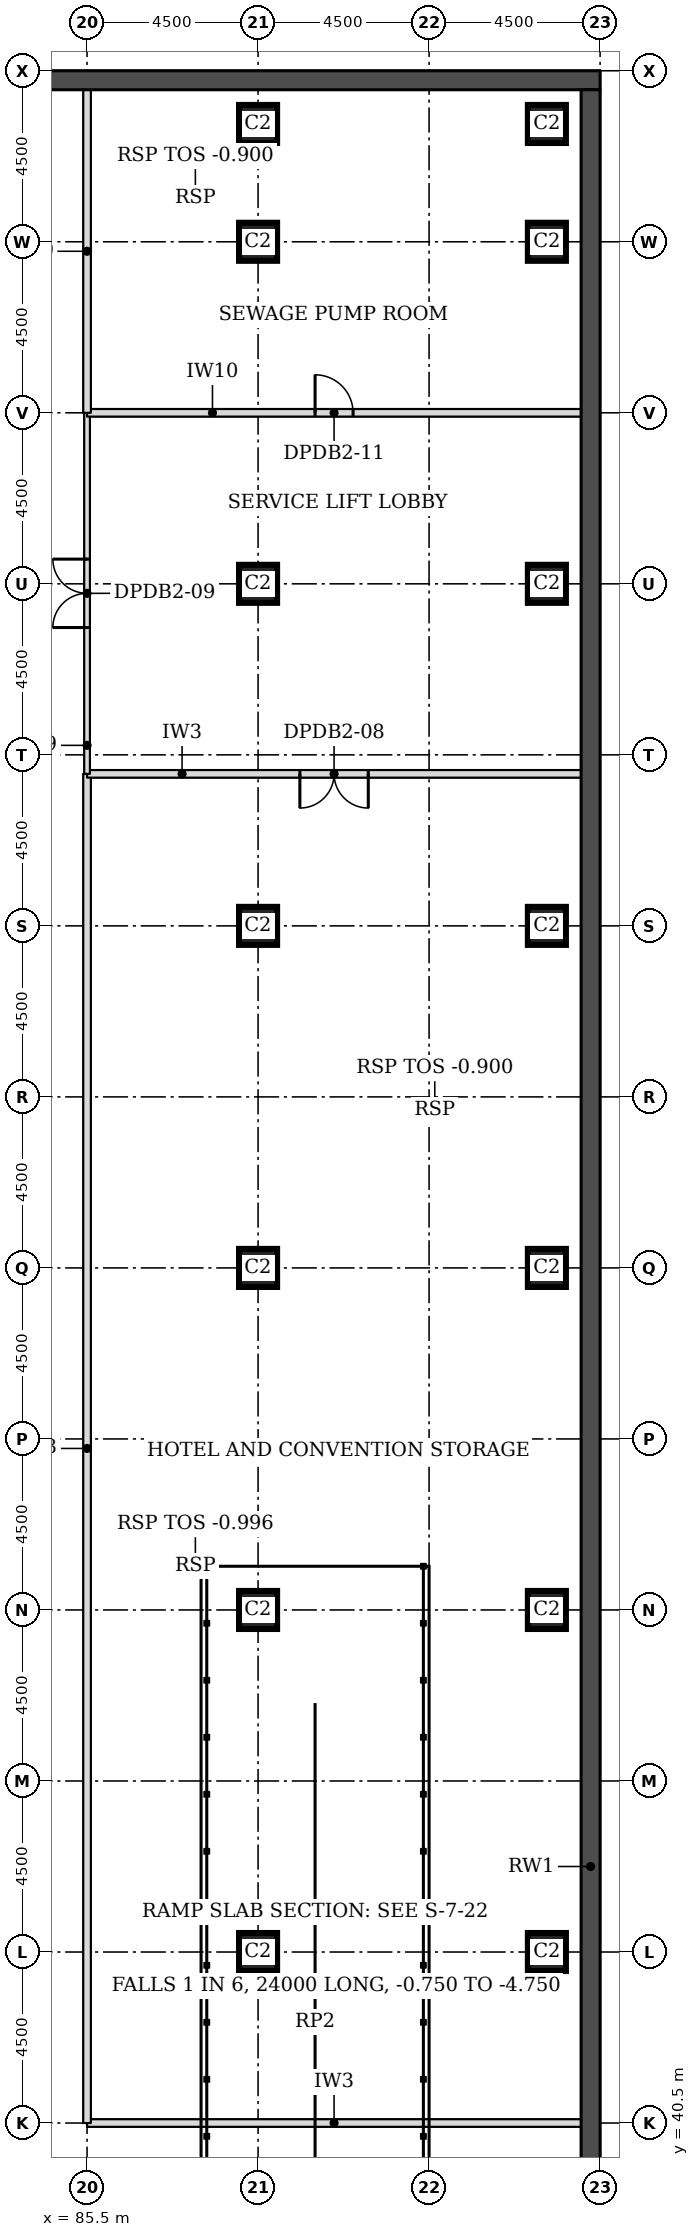
"""IFC4 building model, lengths in metres.
Left out: names, types, materials, properties, quantities, classifications, styles, units other than length and angle.
Written with IfcOpenShell. Run it as: python <this file> out.ifc"""

import sys

from ifc_helpers import new_model, si_unit, direction, frame, frame_2d, origin, origin_2d, place, context, subcontext, project, spatial, rectangle, hollow_rectangle, extrude, element, fill, save


model = new_model("IFC4")
c1 = context("Model", 3, precision=1e-05, world=origin(), true_north=direction((0.0, 1.0)))
c2 = subcontext(c1, "Body", "Model", "MODEL_VIEW")
j1 = project(units=[si_unit("LENGTHUNIT", "METRE"), si_unit("PLANEANGLEUNIT", "RADIAN")], contexts=[c1])
p1 = place(None, origin())
s1 = spatial("IfcSite", under=j1, at=p1, CompositionType="ELEMENT")
p2 = place(p1, origin())
s2 = spatial("IfcBuilding", under=s1, at=p2, CompositionType="ELEMENT")
p3 = place(p2, frame((0.0, 0.0, -9.0)))
s3 = spatial("IfcBuildingStorey", under=s2, at=p3, CompositionType="ELEMENT", Elevation=-9.0)
p4 = place(p3, frame((0.0, 94.25, -0.4), z_axis=(0.0, 0.0, 1.0), x_axis=(1.0, 0.0, 0.0)))
e1 = element("IfcWall", 1, at=p4, inside=s3, PredefinedType="SOLIDWALL", context=c2, shape_type="SweptSolid", body=[
    extrude(rectangle(XDim=99.0, YDim=0.5, at=frame_2d((49.5, 0.0))), origin(), (0.0, 0.0, 1.0), 4.5),
])
p5 = place(p3, frame((98.75, 0.5, -0.4), z_axis=(0.0, 0.0, 1.0), x_axis=(0.0, 1.0, 0.0)))
e2 = element("IfcWall", 2, at=p5, inside=s3, PredefinedType="SOLIDWALL", context=c2, shape_type="SweptSolid", body=[
    extrude(rectangle(XDim=93.5, YDim=0.5, at=frame_2d((46.75, 0.0))), origin(), (0.0, 0.0, 1.0), 4.5),
])
for number, where, z_axis, x_axis in (
    (3, (90.0, 45.0, -0.4), (0.0, 0.0, 1.0), (1.0, 0.0, 0.0)),
    (4, (90.0, 54.0, -0.4), (0.0, 0.0, 1.0), (1.0, 0.0, 0.0)),
    (5, (90.0, 63.0, -0.4), (0.0, 0.0, 1.0), (1.0, 0.0, 0.0)),
    (6, (90.0, 72.0, -0.4), (0.0, 0.0, 1.0), (1.0, 0.0, 0.0)),
    (7, (90.0, 81.0, -0.4), (0.0, 0.0, 1.0), (1.0, 0.0, 0.0)),
    (8, (90.0, 90.0, -0.4), (0.0, 0.0, 1.0), (1.0, 0.0, 0.0)),
    (9, (97.6, 45.0, -0.4), (0.0, 0.0, 1.0), (1.0, 0.0, 0.0)),
    (10, (97.6, 54.0, -0.4), (0.0, 0.0, 1.0), (1.0, 0.0, 0.0)),
    (11, (97.6, 63.0, -0.4), (0.0, 0.0, 1.0), (1.0, 0.0, 0.0)),
    (12, (97.6, 72.0, -0.4), (0.0, 0.0, 1.0), (1.0, 0.0, 0.0)),
    (13, (97.6, 81.0, -0.4), (0.0, 0.0, 1.0), (1.0, 0.0, 0.0)),
    (14, (97.6, 90.0, -0.4), (0.0, 0.0, 1.0), (1.0, 0.0, 0.0)),
    (15, (90.0, 93.1, -0.4), (0.0, 0.0, 1.0), (1.0, 0.0, 0.0)),
    (16, (97.6, 93.1, -0.4), (0.0, 0.0, 1.0), (1.0, 0.0, 0.0)),
):
    element("IfcColumn", number, at=place(p3, frame(where, z_axis=z_axis, x_axis=x_axis)), inside=s3, PredefinedType="COLUMN", context=c2, shape_type="SweptSolid", body=[
        extrude(rectangle(XDim=1.0, YDim=1.0, at=origin_2d()), origin(), (0.0, 0.0, 1.0), 4.9),
    ])
for number, where, z_axis, x_axis in (
    (17, (94.65, 67.15, -0.4), (0.0, 0.0, 1.0), (1.0, 0.0, 0.0)),
    (18, (88.35, 91.15, -0.4), (0.0, 0.0, 1.0), (1.0, 0.0, 0.0)),
):
    element("IfcColumn", number, at=place(p3, frame(where, z_axis=z_axis, x_axis=x_axis)), inside=s3, PredefinedType="COLUMN", context=c2, shape_type="SweptSolid", body=[
        extrude(hollow_rectangle(XDim=0.3, YDim=0.3, WallThickness=0.012, InnerFilletRadius=0.019, OuterFilletRadius=0.031, at=origin_2d()), origin(), (0.0, 0.0, 1.0), 4.5),
    ])
p6 = place(p3, frame((88.35, 55.15, -0.4), z_axis=(0.0, 0.0, 1.0), x_axis=(1.0, 0.0, 0.0)))
e19 = element("IfcColumn", 19, at=p6, inside=s3, PredefinedType="COLUMN", context=c2, shape_type="SweptSolid", body=[
    extrude(hollow_rectangle(XDim=0.3, YDim=0.3, WallThickness=0.012, InnerFilletRadius=0.019, OuterFilletRadius=0.031, at=origin_2d()), origin(), (0.0, 0.0, 1.0), 4.404),
])
p7 = place(p3, frame((85.5, 40.5, 0.0), z_axis=(0.0, 0.0, 1.0), x_axis=(1.0, 0.0, 0.0)))
e20 = element("IfcWall", 20, at=p7, inside=s3, PredefinedType="PARTITIONING", context=c2, shape_type="SweptSolid", body=[
    extrude(rectangle(XDim=13.0, YDim=0.2, at=frame_2d((6.5, 0.0))), origin(), (0.0, 0.0, 1.0), 4.1),
])
p8 = place(p3, frame((85.5, 40.5, 0.0), z_axis=(0.0, 0.0, 1.0), x_axis=(0.0, 1.0, 0.0)))
e21 = element("IfcWall", 21, at=p8, inside=s3, PredefinedType="PARTITIONING", context=c2, shape_type="SweptSolid", body=[
    extrude(rectangle(XDim=35.5, YDim=0.2, at=frame_2d((17.75, 0.0))), origin(), (0.0, 0.0, 1.0), 4.1),
])
p9 = place(p3, frame((85.5, 76.0, 0.0), z_axis=(0.0, 0.0, 1.0), x_axis=(1.0, 0.0, 0.0)))
e22 = element("IfcWall", 22, at=p9, inside=s3, PredefinedType="PARTITIONING", context=c2, shape_type="SweptSolid", body=[
    extrude(rectangle(XDim=13.0, YDim=0.2, at=frame_2d((6.5, 0.0))), origin(), (0.0, 0.0, 1.0), 4.1),
])
p10 = place(p9, frame((5.6, 0.0, 0.0)))
e23 = element("IfcOpeningElement", 23, at=p10, cuts=e22, PredefinedType="OPENING", context=c2, shape_type="SweptSolid", body=[
    extrude(rectangle(XDim=1.8, YDim=2.1, at=frame_2d((0.9, 1.05))), frame((0.0, 0.11, 0.0), z_axis=(0.0, -1.0, 0.0), x_axis=(1.0, 0.0, 0.0)), (0.0, 0.0, 1.0), 0.22),
])
p11 = place(p3, frame((85.5, 76.0, 0.0), z_axis=(0.0, 0.0, 1.0), x_axis=(0.0, 1.0, 0.0)))
e24 = element("IfcWall", 24, at=p11, inside=s3, PredefinedType="PARTITIONING", context=c2, shape_type="SweptSolid", body=[
    extrude(rectangle(XDim=9.5, YDim=0.15, at=frame_2d((4.75, 0.0))), origin(), (0.0, 0.0, 1.0), 4.1),
])
p12 = place(p11, frame((3.85, 0.0, 0.0)))
e25 = element("IfcOpeningElement", 25, at=p12, cuts=e24, PredefinedType="OPENING", context=c2, shape_type="SweptSolid", body=[
    extrude(rectangle(XDim=1.8, YDim=2.1, at=frame_2d((0.9, 1.05))), frame((0.0, 0.085, 0.0), z_axis=(0.0, -1.0, 0.0), x_axis=(1.0, 0.0, 0.0)), (0.0, 0.0, 1.0), 0.17),
])
p13 = place(p3, frame((85.5, 85.5, 0.0), z_axis=(0.0, 0.0, 1.0), x_axis=(1.0, 0.0, 0.0)))
e26 = element("IfcWall", 26, at=p13, inside=s3, PredefinedType="PARTITIONING", context=c2, shape_type="SweptSolid", body=[
    extrude(rectangle(XDim=13.0, YDim=0.2, at=frame_2d((6.5, 0.0))), origin(), (0.0, 0.0, 1.0), 4.1),
])
p14 = place(p13, frame((6.0, 0.0, 0.0)))
e27 = element("IfcOpeningElement", 27, at=p14, cuts=e26, PredefinedType="OPENING", context=c2, shape_type="SweptSolid", body=[
    extrude(rectangle(XDim=1.0, YDim=2.1, at=frame_2d((0.5, 1.05))), frame((0.0, 0.11, 0.0), z_axis=(0.0, -1.0, 0.0), x_axis=(1.0, 0.0, 0.0)), (0.0, 0.0, 1.0), 0.22),
])
p15 = place(p3, frame((85.5, 85.5, 0.0), z_axis=(0.0, 0.0, 1.0), x_axis=(0.0, 1.0, 0.0)))
e28 = element("IfcWall", 28, at=p15, inside=s3, PredefinedType="PARTITIONING", context=c2, shape_type="SweptSolid", body=[
    extrude(rectangle(XDim=8.5, YDim=0.2, at=frame_2d((4.25, 0.0))), origin(), (0.0, 0.0, 1.0), 4.1),
])
p16 = place(p14, origin())
e29 = element("IfcDoor", 29, at=p16, inside=s3, OperationType="SINGLE_SWING_LEFT", PredefinedType="DOOR", context=c2, shape_type="SweptSolid", body=[
    extrude(rectangle(XDim=1.0, YDim=2.1, at=frame_2d((0.5, 1.05))), frame((0.0, 0.025, 0.0), z_axis=(0.0, -1.0, 0.0), x_axis=(1.0, 0.0, 0.0)), (0.0, 0.0, 1.0), 0.05),
])
fill(e27, e29)
p17 = place(p10, frame((1.8, 0.0, 0.0), z_axis=(0.0, 0.0, 1.0), x_axis=(-1.0, 0.0, 0.0)))
e30 = element("IfcDoor", 30, at=p17, inside=s3, OperationType="DOUBLE_DOOR_SINGLE_SWING", PredefinedType="DOOR", context=c2, shape_type="SweptSolid", body=[
    extrude(rectangle(XDim=1.8, YDim=2.1, at=frame_2d((0.9, 1.05))), frame((0.0, 0.025, 0.0), z_axis=(0.0, -1.0, 0.0), x_axis=(1.0, 0.0, 0.0)), (0.0, 0.0, 1.0), 0.05),
])
fill(e23, e30)
p18 = place(p12, origin())
e31 = element("IfcDoor", 31, at=p18, inside=s3, OperationType="DOUBLE_DOOR_SINGLE_SWING", PredefinedType="DOOR", context=c2, shape_type="SweptSolid", body=[
    extrude(rectangle(XDim=1.8, YDim=2.1, at=frame_2d((0.9, 1.05))), frame((0.0, 0.025, 0.0), z_axis=(0.0, -1.0, 0.0), x_axis=(1.0, 0.0, 0.0)), (0.0, 0.0, 1.0), 0.05),
])
fill(e25, e31)
save(model, sys.argv[1])
